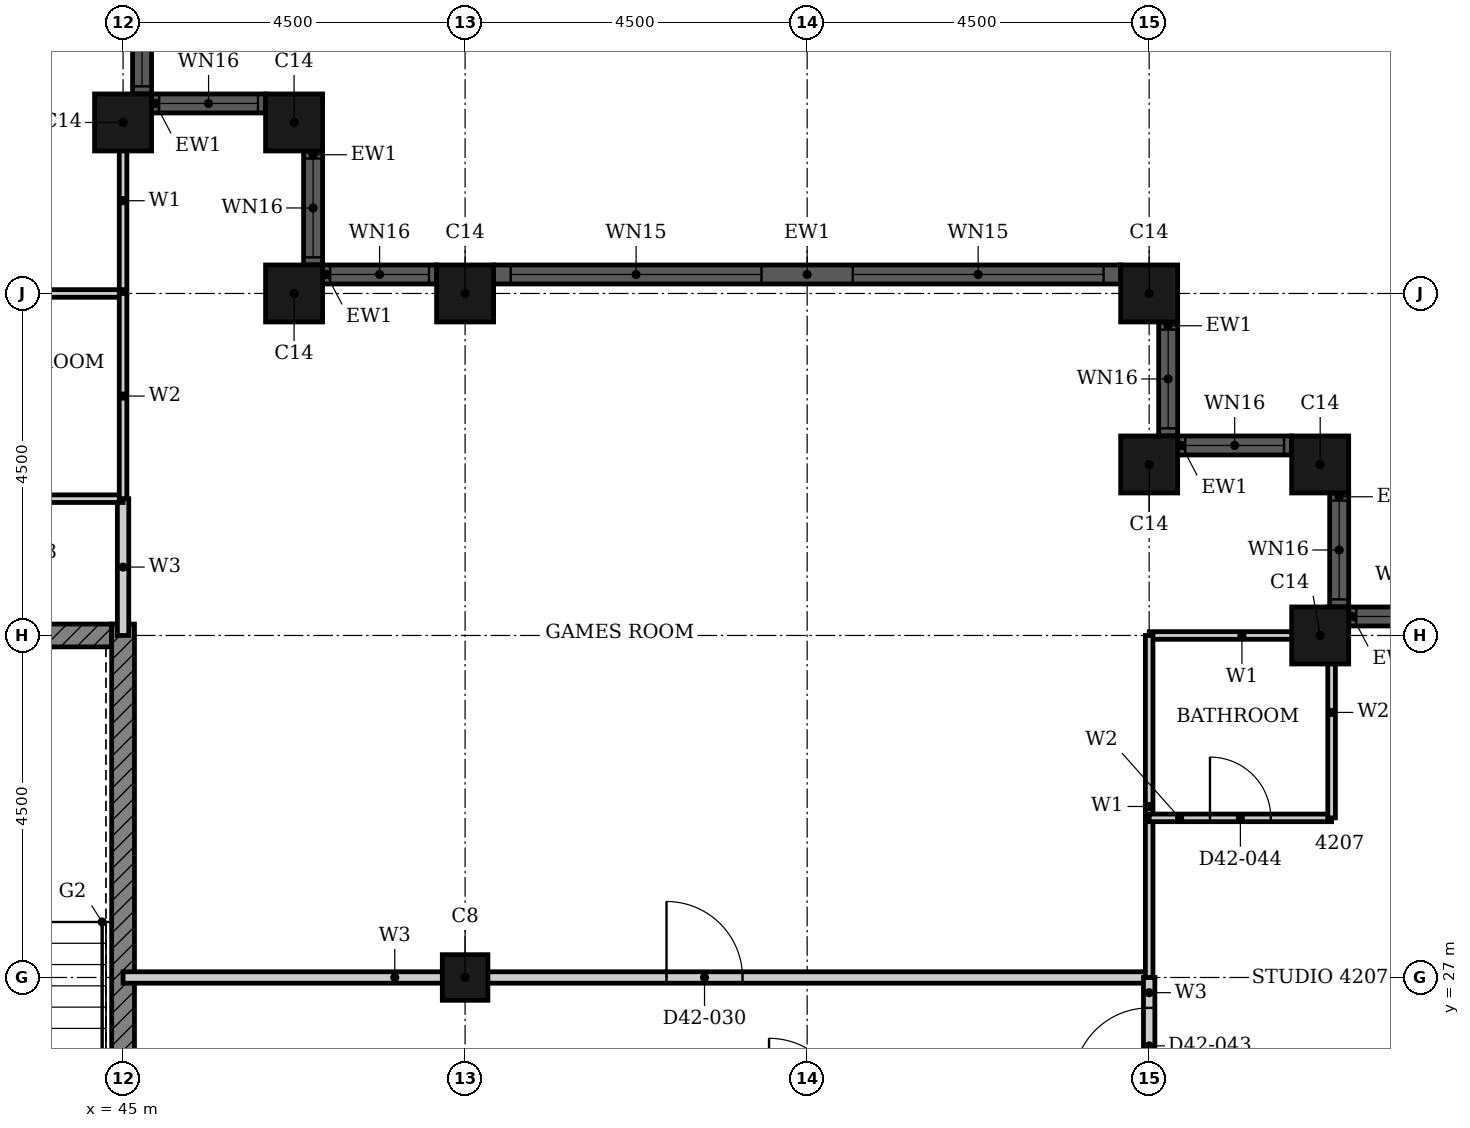
"""IFC4 building model, lengths in metres.
Left out: names, types, materials, properties, quantities, classifications, styles, units other than length and angle.
Written with IfcOpenShell. Run it as: python <this file> out.ifc"""

import sys

from ifc_helpers import new_model, si_unit, direction, frame, frame_2d, origin, origin_2d, place, context, subcontext, project, spatial, rectangle, hollow_rectangle, extrude, element, fill, save


model = new_model("IFC4")
c1 = context("Model", 3, precision=1e-05, world=origin(), true_north=direction((0.0, 1.0)))
c2 = subcontext(c1, "Body", "Model", "MODEL_VIEW")
j1 = project(units=[si_unit("LENGTHUNIT", "METRE"), si_unit("PLANEANGLEUNIT", "RADIAN")], contexts=[c1])
p1 = place(None, origin())
s1 = spatial("IfcSite", under=j1, at=p1, CompositionType="ELEMENT")
p2 = place(p1, origin())
s2 = spatial("IfcBuilding", under=s1, at=p2, CompositionType="ELEMENT")
p3 = place(p2, frame((0.0, 0.0, 169.1)))
s3 = spatial("IfcBuildingStorey", under=s2, at=p3, CompositionType="ELEMENT", Elevation=169.1)
for number, where, z_axis, x_axis in (
    (1, (60.75, 31.5, 0.0), (0.0, 0.0, 1.0), (1.0, 0.0, 0.0)),
    (2, (60.75, 33.75, 0.0), (0.0, 0.0, 1.0), (1.0, 0.0, 0.0)),
    (3, (58.5, 33.75, 0.0), (0.0, 0.0, 1.0), (1.0, 0.0, 0.0)),
    (4, (58.5, 36.0, 0.0), (0.0, 0.0, 1.0), (1.0, 0.0, 0.0)),
    (5, (49.5, 36.0, 0.0), (0.0, 0.0, 1.0), (1.0, 0.0, 0.0)),
    (6, (47.25, 36.0, 0.0), (0.0, 0.0, 1.0), (1.0, 0.0, 0.0)),
    (7, (47.25, 38.25, 0.0), (0.0, 0.0, 1.0), (1.0, 0.0, 0.0)),
    (8, (45.0, 38.25, 0.0), (0.0, 0.0, 1.0), (1.0, 0.0, 0.0)),
):
    element("IfcColumn", number, at=place(p3, frame(where, z_axis=z_axis, x_axis=x_axis)), inside=s3, PredefinedType="COLUMN", context=c2, shape_type="SweptSolid", body=[
        extrude(hollow_rectangle(XDim=0.75, YDim=0.75, WallThickness=0.024, at=origin_2d()), origin(), (0.0, 0.0, 1.0), 3.7),
    ])
p4 = place(p3, frame((49.5, 27.0, 0.0), z_axis=(0.0, 0.0, 1.0), x_axis=(1.0, 0.0, 0.0)))
e9 = element("IfcColumn", 9, at=p4, inside=s3, PredefinedType="COLUMN", context=c2, shape_type="SweptSolid", body=[
    extrude(hollow_rectangle(XDim=0.6, YDim=0.6, WallThickness=0.02, at=origin_2d()), origin(), (0.0, 0.0, 1.0), 3.7),
])
p5 = place(p3, frame((62.625, 31.75, 0.0), z_axis=(0.0, 0.0, 1.0), x_axis=(-1.0, 0.0, 0.0)))
e10 = element("IfcWall", 10, at=p5, inside=s3, PredefinedType="SOLIDWALL", context=c2, shape_type="SweptSolid", body=[
    extrude(rectangle(XDim=1.5, YDim=0.25, at=frame_2d((0.75, 0.0))), origin(), (0.0, 0.0, 1.0), 3.7),
])
p6 = place(p5, frame((0.1, 0.0, 0.9)))
e11 = element("IfcOpeningElement", 11, at=p6, cuts=e10, PredefinedType="OPENING", context=c2, shape_type="SweptSolid", body=[
    extrude(rectangle(XDim=1.3, YDim=1.85, at=frame_2d((0.65, 0.925))), frame((0.0, 0.135, 0.0), z_axis=(0.0, -1.0, 0.0), x_axis=(1.0, 0.0, 0.0)), (0.0, 0.0, 1.0), 0.27),
])
p7 = place(p3, frame((61.0, 31.875, 0.0), z_axis=(0.0, 0.0, 1.0), x_axis=(0.0, 1.0, 0.0)))
e12 = element("IfcWall", 12, at=p7, inside=s3, PredefinedType="SOLIDWALL", context=c2, shape_type="SweptSolid", body=[
    extrude(rectangle(XDim=1.5, YDim=0.25, at=frame_2d((0.75, 0.0))), origin(), (0.0, 0.0, 1.0), 3.7),
])
p8 = place(p7, frame((0.1, 0.0, 0.9)))
e13 = element("IfcOpeningElement", 13, at=p8, cuts=e12, PredefinedType="OPENING", context=c2, shape_type="SweptSolid", body=[
    extrude(rectangle(XDim=1.3, YDim=1.85, at=frame_2d((0.65, 0.925))), frame((0.0, 0.135, 0.0), z_axis=(0.0, -1.0, 0.0), x_axis=(1.0, 0.0, 0.0)), (0.0, 0.0, 1.0), 0.27),
])
p9 = place(p3, frame((60.375, 34.0, 0.0), z_axis=(0.0, 0.0, 1.0), x_axis=(-1.0, 0.0, 0.0)))
e14 = element("IfcWall", 14, at=p9, inside=s3, PredefinedType="SOLIDWALL", context=c2, shape_type="SweptSolid", body=[
    extrude(rectangle(XDim=1.5, YDim=0.25, at=frame_2d((0.75, 0.0))), origin(), (0.0, 0.0, 1.0), 3.7),
])
p10 = place(p9, frame((0.1, 0.0, 0.9)))
e15 = element("IfcOpeningElement", 15, at=p10, cuts=e14, PredefinedType="OPENING", context=c2, shape_type="SweptSolid", body=[
    extrude(rectangle(XDim=1.3, YDim=1.85, at=frame_2d((0.65, 0.925))), frame((0.0, 0.135, 0.0), z_axis=(0.0, -1.0, 0.0), x_axis=(1.0, 0.0, 0.0)), (0.0, 0.0, 1.0), 0.27),
])
p11 = place(p3, frame((58.75, 34.125, 0.0), z_axis=(0.0, 0.0, 1.0), x_axis=(0.0, 1.0, 0.0)))
e16 = element("IfcWall", 16, at=p11, inside=s3, PredefinedType="SOLIDWALL", context=c2, shape_type="SweptSolid", body=[
    extrude(rectangle(XDim=1.5, YDim=0.25, at=frame_2d((0.75, 0.0))), origin(), (0.0, 0.0, 1.0), 3.7),
])
p12 = place(p11, frame((0.1, 0.0, 0.9)))
e17 = element("IfcOpeningElement", 17, at=p12, cuts=e16, PredefinedType="OPENING", context=c2, shape_type="SweptSolid", body=[
    extrude(rectangle(XDim=1.3, YDim=1.85, at=frame_2d((0.65, 0.925))), frame((0.0, 0.135, 0.0), z_axis=(0.0, -1.0, 0.0), x_axis=(1.0, 0.0, 0.0)), (0.0, 0.0, 1.0), 0.27),
])
p13 = place(p3, frame((58.125, 36.25, 0.0), z_axis=(0.0, 0.0, 1.0), x_axis=(-1.0, 0.0, 0.0)))
e18 = element("IfcWall", 18, at=p13, inside=s3, PredefinedType="SOLIDWALL", context=c2, shape_type="SweptSolid", body=[
    extrude(rectangle(XDim=8.25, YDim=0.25, at=frame_2d((4.125, 0.0))), origin(), (0.0, 0.0, 1.0), 3.7),
])
p14 = place(p13, frame((0.225, 0.0, 0.45)))
e19 = element("IfcOpeningElement", 19, at=p14, cuts=e18, PredefinedType="OPENING", context=c2, shape_type="SweptSolid", body=[
    extrude(rectangle(XDim=3.3, YDim=2.3, at=frame_2d((1.65, 1.15))), frame((0.0, 0.135, 0.0), z_axis=(0.0, -1.0, 0.0), x_axis=(1.0, 0.0, 0.0)), (0.0, 0.0, 1.0), 0.27),
])
p15 = place(p13, frame((4.725, 0.0, 0.45)))
e20 = element("IfcOpeningElement", 20, at=p15, cuts=e18, PredefinedType="OPENING", context=c2, shape_type="SweptSolid", body=[
    extrude(rectangle(XDim=3.3, YDim=2.3, at=frame_2d((1.65, 1.15))), frame((0.0, 0.135, 0.0), z_axis=(0.0, -1.0, 0.0), x_axis=(1.0, 0.0, 0.0)), (0.0, 0.0, 1.0), 0.27),
])
p16 = place(p3, frame((49.125, 36.25, 0.0), z_axis=(0.0, 0.0, 1.0), x_axis=(-1.0, 0.0, 0.0)))
e21 = element("IfcWall", 21, at=p16, inside=s3, PredefinedType="SOLIDWALL", context=c2, shape_type="SweptSolid", body=[
    extrude(rectangle(XDim=1.5, YDim=0.25, at=frame_2d((0.75, 0.0))), origin(), (0.0, 0.0, 1.0), 3.7),
])
p17 = place(p16, frame((0.1, 0.0, 0.9)))
e22 = element("IfcOpeningElement", 22, at=p17, cuts=e21, PredefinedType="OPENING", context=c2, shape_type="SweptSolid", body=[
    extrude(rectangle(XDim=1.3, YDim=1.85, at=frame_2d((0.65, 0.925))), frame((0.0, 0.135, 0.0), z_axis=(0.0, -1.0, 0.0), x_axis=(1.0, 0.0, 0.0)), (0.0, 0.0, 1.0), 0.27),
])
p18 = place(p3, frame((47.5, 36.375, 0.0), z_axis=(0.0, 0.0, 1.0), x_axis=(0.0, 1.0, 0.0)))
e23 = element("IfcWall", 23, at=p18, inside=s3, PredefinedType="SOLIDWALL", context=c2, shape_type="SweptSolid", body=[
    extrude(rectangle(XDim=1.5, YDim=0.25, at=frame_2d((0.75, 0.0))), origin(), (0.0, 0.0, 1.0), 3.7),
])
p19 = place(p18, frame((0.1, 0.0, 0.9)))
e24 = element("IfcOpeningElement", 24, at=p19, cuts=e23, PredefinedType="OPENING", context=c2, shape_type="SweptSolid", body=[
    extrude(rectangle(XDim=1.3, YDim=1.85, at=frame_2d((0.65, 0.925))), frame((0.0, 0.135, 0.0), z_axis=(0.0, -1.0, 0.0), x_axis=(1.0, 0.0, 0.0)), (0.0, 0.0, 1.0), 0.27),
])
p20 = place(p3, frame((46.875, 38.5, 0.0), z_axis=(0.0, 0.0, 1.0), x_axis=(-1.0, 0.0, 0.0)))
e25 = element("IfcWall", 25, at=p20, inside=s3, PredefinedType="SOLIDWALL", context=c2, shape_type="SweptSolid", body=[
    extrude(rectangle(XDim=1.5, YDim=0.25, at=frame_2d((0.75, 0.0))), origin(), (0.0, 0.0, 1.0), 3.7),
])
p21 = place(p20, frame((0.1, 0.0, 0.9)))
e26 = element("IfcOpeningElement", 26, at=p21, cuts=e25, PredefinedType="OPENING", context=c2, shape_type="SweptSolid", body=[
    extrude(rectangle(XDim=1.3, YDim=1.85, at=frame_2d((0.65, 0.925))), frame((0.0, 0.135, 0.0), z_axis=(0.0, -1.0, 0.0), x_axis=(1.0, 0.0, 0.0)), (0.0, 0.0, 1.0), 0.27),
])
p22 = place(p3, frame((45.25, 38.625, 0.0), z_axis=(0.0, 0.0, 1.0), x_axis=(0.0, 1.0, 0.0)))
e27 = element("IfcWall", 27, at=p22, inside=s3, PredefinedType="SOLIDWALL", context=c2, shape_type="SweptSolid", body=[
    extrude(rectangle(XDim=1.5, YDim=0.25, at=frame_2d((0.75, 0.0))), origin(), (0.0, 0.0, 1.0), 3.7),
])
p23 = place(p22, frame((0.1, 0.0, 0.9)))
e28 = element("IfcOpeningElement", 28, at=p23, cuts=e27, PredefinedType="OPENING", context=c2, shape_type="SweptSolid", body=[
    extrude(rectangle(XDim=1.3, YDim=1.85, at=frame_2d((0.65, 0.925))), frame((0.0, 0.135, 0.0), z_axis=(0.0, -1.0, 0.0), x_axis=(1.0, 0.0, 0.0)), (0.0, 0.0, 1.0), 0.27),
])
p24 = place(p3, frame((40.625, 31.5, 0.0), z_axis=(0.0, 0.0, 1.0), x_axis=(1.0, 0.0, 0.0)))
e29 = element("IfcWall", 29, at=p24, inside=s3, PredefinedType="SHEAR", context=c2, shape_type="SweptSolid", body=[
    extrude(rectangle(XDim=4.225, YDim=0.3, at=frame_2d((2.113, 0.0))), origin(), (0.0, 0.0, 1.0), 3.4),
])
p25 = place(p3, frame((45.0, 22.35, 0.0), z_axis=(0.0, 0.0, 1.0), x_axis=(0.0, 1.0, 0.0)))
e30 = element("IfcWall", 30, at=p25, inside=s3, PredefinedType="SHEAR", context=c2, shape_type="SweptSolid", body=[
    extrude(rectangle(XDim=9.3, YDim=0.3, at=frame_2d((4.65, 0.0))), origin(), (0.0, 0.0, 1.0), 3.4),
])
p26 = place(p3, frame((45.0, 27.0, 0.0), z_axis=(0.0, 0.0, 1.0), x_axis=(1.0, 0.0, 0.0)))
e31 = element("IfcWall", 31, at=p26, inside=s3, PredefinedType="PARTITIONING", context=c2, shape_type="SweptSolid", body=[
    extrude(rectangle(XDim=13.5, YDim=0.15, at=frame_2d((6.75, 0.0))), origin(), (0.0, 0.0, 1.0), 2.68),
])
p27 = place(p26, frame((7.15, 0.0, 0.0)))
e32 = element("IfcOpeningElement", 32, at=p27, cuts=e31, PredefinedType="OPENING", context=c2, shape_type="SweptSolid", body=[
    extrude(rectangle(XDim=1.0, YDim=2.1, at=frame_2d((0.5, 1.05))), frame((0.0, 0.085, 0.0), z_axis=(0.0, -1.0, 0.0), x_axis=(1.0, 0.0, 0.0)), (0.0, 0.0, 1.0), 0.17),
])
p28 = place(p3, frame((45.0, 31.5, 0.0), z_axis=(0.0, 0.0, 1.0), x_axis=(0.0, 1.0, 0.0)))
e33 = element("IfcWall", 33, at=p28, inside=s3, PredefinedType="PARTITIONING", context=c2, shape_type="SweptSolid", body=[
    extrude(rectangle(XDim=1.8, YDim=0.15, at=frame_2d((0.9, 0.0))), origin(), (0.0, 0.0, 1.0), 3.4),
])
p29 = place(p3, frame((58.5, 25.2, 0.0), z_axis=(0.0, 0.0, 1.0), x_axis=(0.0, 1.0, 0.0)))
e34 = element("IfcWall", 34, at=p29, inside=s3, PredefinedType="PARTITIONING", context=c2, shape_type="SweptSolid", body=[
    extrude(rectangle(XDim=1.8, YDim=0.15, at=frame_2d((0.9, 0.0))), origin(), (0.0, 0.0, 1.0), 3.4),
])
p30 = place(p29, frame((0.4, 0.0, 0.0)))
e35 = element("IfcOpeningElement", 35, at=p30, cuts=e34, PredefinedType="OPENING", context=c2, shape_type="SweptSolid", body=[
    extrude(rectangle(XDim=1.0, YDim=2.2, at=frame_2d((0.5, 1.1))), frame((0.0, 0.085, 0.0), z_axis=(0.0, -1.0, 0.0), x_axis=(1.0, 0.0, 0.0)), (0.0, 0.0, 1.0), 0.17),
])
p31 = place(p3, frame((58.501, 31.5, 0.0), z_axis=(0.0, 0.0, 1.0), x_axis=(1.0, 0.0, 0.0)))
e36 = element("IfcWall", 36, at=p31, inside=s3, PredefinedType="PARTITIONING", context=c2, shape_type="SweptSolid", body=[
    extrude(rectangle(XDim=2.439, YDim=0.1, at=frame_2d((1.219, 0.0))), origin(), (0.0, 0.0, 1.0), 2.68),
])
p32 = place(p3, frame((45.0, 36.001, 0.0), z_axis=(0.0, 0.0, 1.0), x_axis=(0.0, 1.0, 0.0)))
e37 = element("IfcWall", 37, at=p32, inside=s3, PredefinedType="PARTITIONING", context=c2, shape_type="SweptSolid", body=[
    extrude(rectangle(XDim=2.439, YDim=0.1, at=frame_2d((1.219, 0.0))), origin(), (0.0, 0.0, 1.0), 3.4),
])
p33 = place(p3, frame((58.5, 27.0, 0.0), z_axis=(0.0, 0.0, 1.0), x_axis=(0.0, 1.0, 0.0)))
e38 = element("IfcWall", 38, at=p33, inside=s3, PredefinedType="PARTITIONING", context=c2, shape_type="SweptSolid", body=[
    extrude(rectangle(XDim=4.5, YDim=0.1, at=frame_2d((2.25, 0.0))), origin(), (0.0, 0.0, 1.0), 3.4),
])
p34 = place(p3, frame((58.5, 29.1, 0.0), z_axis=(0.0, 0.0, 1.0), x_axis=(1.0, 0.0, 0.0)))
e39 = element("IfcWall", 39, at=p34, inside=s3, PredefinedType="PARTITIONING", context=c2, shape_type="SweptSolid", body=[
    extrude(rectangle(XDim=2.4, YDim=0.1, at=frame_2d((1.2, 0.0))), origin(), (0.0, 0.0, 1.0), 3.4),
])
p35 = place(p34, frame((0.8, 0.0, 0.0)))
e40 = element("IfcOpeningElement", 40, at=p35, cuts=e39, PredefinedType="OPENING", context=c2, shape_type="SweptSolid", body=[
    extrude(rectangle(XDim=0.8, YDim=2.1, at=frame_2d((0.4, 1.05))), frame((0.0, 0.06, 0.0), z_axis=(0.0, -1.0, 0.0), x_axis=(1.0, 0.0, 0.0)), (0.0, 0.0, 1.0), 0.12),
])
for number, where, z_axis, x_axis in (
    (41, (42.6, 33.3, 0.0), (0.0, 0.0, 1.0), (1.0, 0.0, 0.0)),
    (42, (42.6, 36.0, 0.0), (0.0, 0.0, 1.0), (1.0, 0.0, 0.0)),
):
    element("IfcWall", number, at=place(p3, frame(where, z_axis=z_axis, x_axis=x_axis)), inside=s3, PredefinedType="PARTITIONING", context=c2, shape_type="SweptSolid", body=[
        extrude(rectangle(XDim=2.4, YDim=0.1, at=frame_2d((1.2, 0.0))), origin(), (0.0, 0.0, 1.0), 3.4),
    ])
p36 = place(p3, frame((45.0, 33.3, 0.0), z_axis=(0.0, 0.0, 1.0), x_axis=(0.0, 1.0, 0.0)))
e43 = element("IfcWall", 43, at=p36, inside=s3, PredefinedType="PARTITIONING", context=c2, shape_type="SweptSolid", body=[
    extrude(rectangle(XDim=2.7, YDim=0.1, at=frame_2d((1.35, 0.0))), origin(), (0.0, 0.0, 1.0), 3.4),
])
p37 = place(p3, frame((60.9, 29.1, 0.0), z_axis=(0.0, 0.0, 1.0), x_axis=(0.0, 1.0, 0.0)))
e44 = element("IfcWall", 44, at=p37, inside=s3, PredefinedType="PARTITIONING", context=c2, shape_type="SweptSolid", body=[
    extrude(rectangle(XDim=2.775, YDim=0.1, at=frame_2d((1.387, 0.0))), origin(), (0.0, 0.0, 1.0), 3.4),
])
p38 = place(p6, origin())
e45 = element("IfcWindow", 45, at=p38, inside=s3, PartitioningType="SINGLE_PANEL", PredefinedType="WINDOW", context=c2, shape_type="SweptSolid", body=[
    extrude(rectangle(XDim=1.3, YDim=1.85, at=frame_2d((0.65, 0.925))), frame((0.0, 0.03, 0.0), z_axis=(0.0, -1.0, 0.0), x_axis=(1.0, 0.0, 0.0)), (0.0, 0.0, 1.0), 0.06),
])
fill(e11, e45)
p39 = place(p8, origin())
e46 = element("IfcWindow", 46, at=p39, inside=s3, PartitioningType="SINGLE_PANEL", PredefinedType="WINDOW", context=c2, shape_type="SweptSolid", body=[
    extrude(rectangle(XDim=1.3, YDim=1.85, at=frame_2d((0.65, 0.925))), frame((0.0, 0.03, 0.0), z_axis=(0.0, -1.0, 0.0), x_axis=(1.0, 0.0, 0.0)), (0.0, 0.0, 1.0), 0.06),
])
fill(e13, e46)
p40 = place(p10, origin())
e47 = element("IfcWindow", 47, at=p40, inside=s3, PartitioningType="SINGLE_PANEL", PredefinedType="WINDOW", context=c2, shape_type="SweptSolid", body=[
    extrude(rectangle(XDim=1.3, YDim=1.85, at=frame_2d((0.65, 0.925))), frame((0.0, 0.03, 0.0), z_axis=(0.0, -1.0, 0.0), x_axis=(1.0, 0.0, 0.0)), (0.0, 0.0, 1.0), 0.06),
])
fill(e15, e47)
p41 = place(p12, origin())
e48 = element("IfcWindow", 48, at=p41, inside=s3, PartitioningType="SINGLE_PANEL", PredefinedType="WINDOW", context=c2, shape_type="SweptSolid", body=[
    extrude(rectangle(XDim=1.3, YDim=1.85, at=frame_2d((0.65, 0.925))), frame((0.0, 0.03, 0.0), z_axis=(0.0, -1.0, 0.0), x_axis=(1.0, 0.0, 0.0)), (0.0, 0.0, 1.0), 0.06),
])
fill(e17, e48)
p42 = place(p14, origin())
e49 = element("IfcWindow", 49, at=p42, inside=s3, PartitioningType="SINGLE_PANEL", PredefinedType="WINDOW", context=c2, shape_type="SweptSolid", body=[
    extrude(rectangle(XDim=3.3, YDim=2.3, at=frame_2d((1.65, 1.15))), frame((0.0, 0.03, 0.0), z_axis=(0.0, -1.0, 0.0), x_axis=(1.0, 0.0, 0.0)), (0.0, 0.0, 1.0), 0.06),
])
fill(e19, e49)
p43 = place(p15, origin())
e50 = element("IfcWindow", 50, at=p43, inside=s3, PartitioningType="SINGLE_PANEL", PredefinedType="WINDOW", context=c2, shape_type="SweptSolid", body=[
    extrude(rectangle(XDim=3.3, YDim=2.3, at=frame_2d((1.65, 1.15))), frame((0.0, 0.03, 0.0), z_axis=(0.0, -1.0, 0.0), x_axis=(1.0, 0.0, 0.0)), (0.0, 0.0, 1.0), 0.06),
])
fill(e20, e50)
p44 = place(p17, origin())
e51 = element("IfcWindow", 51, at=p44, inside=s3, PartitioningType="SINGLE_PANEL", PredefinedType="WINDOW", context=c2, shape_type="SweptSolid", body=[
    extrude(rectangle(XDim=1.3, YDim=1.85, at=frame_2d((0.65, 0.925))), frame((0.0, 0.03, 0.0), z_axis=(0.0, -1.0, 0.0), x_axis=(1.0, 0.0, 0.0)), (0.0, 0.0, 1.0), 0.06),
])
fill(e22, e51)
p45 = place(p19, origin())
e52 = element("IfcWindow", 52, at=p45, inside=s3, PartitioningType="SINGLE_PANEL", PredefinedType="WINDOW", context=c2, shape_type="SweptSolid", body=[
    extrude(rectangle(XDim=1.3, YDim=1.85, at=frame_2d((0.65, 0.925))), frame((0.0, 0.03, 0.0), z_axis=(0.0, -1.0, 0.0), x_axis=(1.0, 0.0, 0.0)), (0.0, 0.0, 1.0), 0.06),
])
fill(e24, e52)
p46 = place(p21, origin())
e53 = element("IfcWindow", 53, at=p46, inside=s3, PartitioningType="SINGLE_PANEL", PredefinedType="WINDOW", context=c2, shape_type="SweptSolid", body=[
    extrude(rectangle(XDim=1.3, YDim=1.85, at=frame_2d((0.65, 0.925))), frame((0.0, 0.03, 0.0), z_axis=(0.0, -1.0, 0.0), x_axis=(1.0, 0.0, 0.0)), (0.0, 0.0, 1.0), 0.06),
])
fill(e26, e53)
p47 = place(p23, origin())
e54 = element("IfcWindow", 54, at=p47, inside=s3, PartitioningType="SINGLE_PANEL", PredefinedType="WINDOW", context=c2, shape_type="SweptSolid", body=[
    extrude(rectangle(XDim=1.3, YDim=1.85, at=frame_2d((0.65, 0.925))), frame((0.0, 0.03, 0.0), z_axis=(0.0, -1.0, 0.0), x_axis=(1.0, 0.0, 0.0)), (0.0, 0.0, 1.0), 0.06),
])
fill(e28, e54)
p48 = place(p27, origin())
e55 = element("IfcDoor", 55, at=p48, inside=s3, OperationType="SINGLE_SWING_RIGHT", PredefinedType="DOOR", context=c2, shape_type="SweptSolid", body=[
    extrude(rectangle(XDim=1.0, YDim=2.1, at=frame_2d((0.5, 1.05))), frame((0.0, 0.025, 0.0), z_axis=(0.0, -1.0, 0.0), x_axis=(1.0, 0.0, 0.0)), (0.0, 0.0, 1.0), 0.05),
])
fill(e32, e55)
p49 = place(p30, origin())
e56 = element("IfcDoor", 56, at=p49, inside=s3, OperationType="SINGLE_SWING_RIGHT", PredefinedType="DOOR", context=c2, shape_type="SweptSolid", body=[
    extrude(rectangle(XDim=1.0, YDim=2.2, at=frame_2d((0.5, 1.1))), frame((0.0, 0.025, 0.0), z_axis=(0.0, -1.0, 0.0), x_axis=(1.0, 0.0, 0.0)), (0.0, 0.0, 1.0), 0.05),
])
fill(e35, e56)
p50 = place(p35, origin())
e57 = element("IfcDoor", 57, at=p50, inside=s3, OperationType="SINGLE_SWING_RIGHT", PredefinedType="DOOR", context=c2, shape_type="SweptSolid", body=[
    extrude(rectangle(XDim=0.8, YDim=2.1, at=frame_2d((0.4, 1.05))), frame((0.0, 0.025, 0.0), z_axis=(0.0, -1.0, 0.0), x_axis=(1.0, 0.0, 0.0)), (0.0, 0.0, 1.0), 0.05),
])
fill(e40, e57)
save(model, sys.argv[1])
